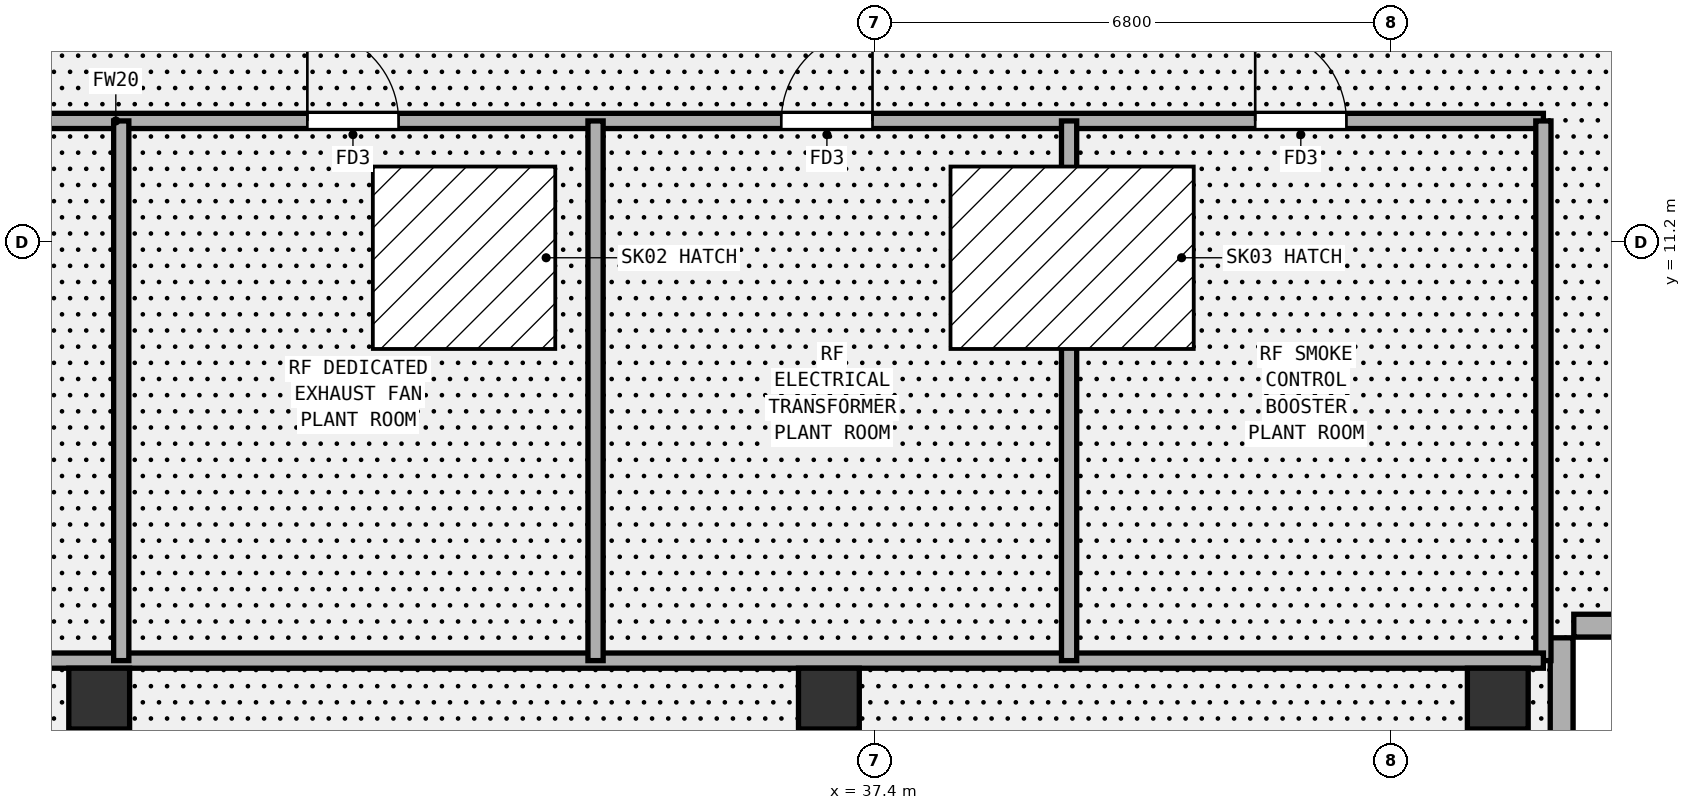
"""IFC4 building model, lengths in metres.
Left out: names, types, materials, properties, quantities, classifications, styles, units other than length and angle.
Written with IfcOpenShell. Run it as: python <this file> out.ifc"""

import sys

from ifc_helpers import new_model, si_unit, direction, frame, frame_2d, origin, origin_2d, place, context, subcontext, project, spatial, rectangle, extrude, element, fill, save


model = new_model("IFC4")
c1 = context("Model", 3, precision=1e-05, world=origin(), true_north=direction((0.0, 1.0)))
c2 = subcontext(c1, "Body", "Model", "MODEL_VIEW")
j1 = project(units=[si_unit("LENGTHUNIT", "METRE"), si_unit("PLANEANGLEUNIT", "RADIAN")], contexts=[c1])
p1 = place(None, origin())
s1 = spatial("IfcSite", under=j1, at=p1, CompositionType="ELEMENT")
p2 = place(p1, origin())
s2 = spatial("IfcBuilding", under=s1, at=p2, CompositionType="ELEMENT")
p3 = place(p2, frame((0.0, 0.0, 360.4)))
s3 = spatial("IfcBuildingStorey", under=s2, at=p3, CompositionType="ELEMENT", Elevation=360.4)
p4 = place(p3, frame((27.2, 5.2, 0.0), z_axis=(0.0, 0.0, 1.0), x_axis=(1.0, 0.0, 0.0)))
e1 = element("IfcColumn", 1, at=p4, inside=s3, PredefinedType="COLUMN", context=c2, shape_type="SweptSolid", body=[
    extrude(rectangle(XDim=0.8, YDim=0.8, at=origin_2d()), origin(), (0.0, 0.0, 1.0), 4.91),
])
p5 = place(p3, frame((36.8, 5.2, 0.0), z_axis=(0.0, 0.0, 1.0), x_axis=(1.0, 0.0, 0.0)))
e2 = element("IfcColumn", 2, at=p5, inside=s3, PredefinedType="COLUMN", context=c2, shape_type="SweptSolid", body=[
    extrude(rectangle(XDim=0.8, YDim=0.8, at=origin_2d()), origin(), (0.0, 0.0, 1.0), 5.094),
])
p6 = place(p3, frame((45.6, 5.2, 0.0), z_axis=(0.0, 0.0, 1.0), x_axis=(1.0, 0.0, 0.0)))
e3 = element("IfcColumn", 3, at=p6, inside=s3, PredefinedType="COLUMN", context=c2, shape_type="SweptSolid", body=[
    extrude(rectangle(XDim=0.8, YDim=0.8, at=origin_2d()), origin(), (0.0, 0.0, 1.0), 5.263),
])
for number, where, z_axis, x_axis in (
    (4, (46.44, 4.0, 0.0), (0.0, 0.0, 1.0), (0.0, 1.0, 0.0)),
    (5, (46.6, 6.16, 0.0), (0.0, 0.0, 1.0), (1.0, 0.0, 0.0)),
):
    element("IfcWall", number, at=place(p3, frame(where, z_axis=z_axis, x_axis=x_axis)), inside=s3, PredefinedType="PARAPET", context=c2, shape_type="SweptSolid", body=[
        extrude(rectangle(XDim=2.0, YDim=0.3, at=frame_2d((1.0, 0.0))), origin(), (0.0, 0.0, 1.0), 5.292),
    ])
p7 = place(p3, frame((21.25, 12.8, 0.0), z_axis=(0.0, 0.0, 1.0), x_axis=(1.0, 0.0, 0.0)))
e6 = element("IfcWall", 6, at=p7, inside=s3, PredefinedType="PARTITIONING", context=c2, shape_type="SweptSolid", body=[
    extrude(rectangle(XDim=24.95, YDim=0.2, at=frame_2d((12.475, 0.0))), origin(), (0.0, 0.0, 1.0), 4.48),
])
p8 = place(p7, frame((2.448, 0.0, 0.0)))
e7 = element("IfcOpeningElement", 7, at=p8, cuts=e6, PredefinedType="OPENING", context=c2, shape_type="SweptSolid", body=[
    extrude(rectangle(XDim=1.2, YDim=2.25, at=frame_2d((0.6, 1.125))), frame((0.0, 0.11, 0.0), z_axis=(0.0, -1.0, 0.0), x_axis=(1.0, 0.0, 0.0)), (0.0, 0.0, 1.0), 0.22),
])
p9 = place(p7, frame((8.689, 0.0, 0.0)))
e8 = element("IfcOpeningElement", 8, at=p9, cuts=e6, PredefinedType="OPENING", context=c2, shape_type="SweptSolid", body=[
    extrude(rectangle(XDim=1.2, YDim=2.25, at=frame_2d((0.6, 1.125))), frame((0.0, 0.11, 0.0), z_axis=(0.0, -1.0, 0.0), x_axis=(1.0, 0.0, 0.0)), (0.0, 0.0, 1.0), 0.22),
])
p10 = place(p7, frame((14.924, 0.0, 0.0)))
e9 = element("IfcOpeningElement", 9, at=p10, cuts=e6, PredefinedType="OPENING", context=c2, shape_type="SweptSolid", body=[
    extrude(rectangle(XDim=1.2, YDim=2.25, at=frame_2d((0.6, 1.125))), frame((0.0, 0.11, 0.0), z_axis=(0.0, -1.0, 0.0), x_axis=(1.0, 0.0, 0.0)), (0.0, 0.0, 1.0), 0.22),
])
p11 = place(p7, frame((21.159, 0.0, 0.0)))
e10 = element("IfcOpeningElement", 10, at=p11, cuts=e6, PredefinedType="OPENING", context=c2, shape_type="SweptSolid", body=[
    extrude(rectangle(XDim=1.2, YDim=2.25, at=frame_2d((0.6, 1.125))), frame((0.0, 0.11, 0.0), z_axis=(0.0, -1.0, 0.0), x_axis=(1.0, 0.0, 0.0)), (0.0, 0.0, 1.0), 0.22),
])
p12 = place(p3, frame((46.2, 5.7, 0.0), z_axis=(0.0, 0.0, 1.0), x_axis=(0.0, 1.0, 0.0)))
e11 = element("IfcWall", 11, at=p12, inside=s3, PredefinedType="PARTITIONING", context=c2, shape_type="SweptSolid", body=[
    extrude(rectangle(XDim=7.1, YDim=0.2, at=frame_2d((3.55, 0.0))), origin(), (0.0, 0.0, 1.0), 4.48),
])
p13 = place(p3, frame((21.25, 5.7, 0.0), z_axis=(0.0, 0.0, 1.0), x_axis=(1.0, 0.0, 0.0)))
e12 = element("IfcWall", 12, at=p13, inside=s3, PredefinedType="PARTITIONING", context=c2, shape_type="SweptSolid", body=[
    extrude(rectangle(XDim=24.95, YDim=0.2, at=frame_2d((12.475, 0.0))), origin(), (0.0, 0.0, 1.0), 4.48),
])
p14 = place(p3, frame((27.49, 5.7, 0.0), z_axis=(0.0, 0.0, 1.0), x_axis=(0.0, 1.0, 0.0)))
e13 = element("IfcWall", 13, at=p14, inside=s3, PredefinedType="PARTITIONING", context=c2, shape_type="SweptSolid", body=[
    extrude(rectangle(XDim=7.1, YDim=0.2, at=frame_2d((3.55, 0.0))), origin(), (0.0, 0.0, 1.0), 4.41),
])
for number, where, z_axis, x_axis in (
    (14, (33.73, 5.7, 0.0), (0.0, 0.0, 1.0), (0.0, 1.0, 0.0)),
    (15, (39.96, 5.7, 0.0), (0.0, 0.0, 1.0), (0.0, 1.0, 0.0)),
):
    element("IfcWall", number, at=place(p3, frame(where, z_axis=z_axis, x_axis=x_axis)), inside=s3, PredefinedType="PARTITIONING", context=c2, shape_type="SweptSolid", body=[
        extrude(rectangle(XDim=7.1, YDim=0.2, at=frame_2d((3.55, 0.0))), origin(), (0.0, 0.0, 1.0), 4.48),
    ])
p15 = place(p3, frame((6.8, 4.0, 4.799), z_axis=(-0.019179722964, -9.68549e-07, 0.999816052195), x_axis=(0.999816052195, -8e-12, 0.019179722964)))
p16 = place(p15, frame((25.205, 7.0, 0.0)))
p17 = place(p16, frame((0.0, 0.0, -0.05)))
e16 = element("IfcWindow", 16, at=p17, inside=s3, PartitioningType="SINGLE_PANEL", PredefinedType="SKYLIGHT", context=c2, shape_type="SweptSolid", body=[
    extrude(rectangle(XDim=2.4, YDim=2.4, at=origin_2d()), origin(), (0.0, 0.0, 1.0), 0.05),
])
p18 = place(p15, frame((33.206, 7.0, 0.0)))
p19 = place(p18, frame((0.0, 0.0, -0.05)))
e17 = element("IfcWindow", 17, at=p19, inside=s3, PartitioningType="SINGLE_PANEL", PredefinedType="SKYLIGHT", context=c2, shape_type="SweptSolid", body=[
    extrude(rectangle(XDim=3.2, YDim=2.4, at=origin_2d()), origin(), (0.0, 0.0, 1.0), 0.05),
])
p20 = place(p9, origin())
e18 = element("IfcDoor", 18, at=p20, inside=s3, OperationType="SINGLE_SWING_LEFT", PredefinedType="DOOR", context=c2, shape_type="SweptSolid", body=[
    extrude(rectangle(XDim=1.2, YDim=2.25, at=frame_2d((0.6, 1.125))), frame((0.0, 0.025, 0.0), z_axis=(0.0, -1.0, 0.0), x_axis=(1.0, 0.0, 0.0)), (0.0, 0.0, 1.0), 0.05),
])
fill(e8, e18)
p21 = place(p10, origin())
e19 = element("IfcDoor", 19, at=p21, inside=s3, OperationType="SINGLE_SWING_RIGHT", PredefinedType="DOOR", context=c2, shape_type="SweptSolid", body=[
    extrude(rectangle(XDim=1.2, YDim=2.25, at=frame_2d((0.6, 1.125))), frame((0.0, 0.025, 0.0), z_axis=(0.0, -1.0, 0.0), x_axis=(1.0, 0.0, 0.0)), (0.0, 0.0, 1.0), 0.05),
])
fill(e9, e19)
p22 = place(p11, origin())
e20 = element("IfcDoor", 20, at=p22, inside=s3, OperationType="SINGLE_SWING_LEFT", PredefinedType="DOOR", context=c2, shape_type="SweptSolid", body=[
    extrude(rectangle(XDim=1.2, YDim=2.25, at=frame_2d((0.6, 1.125))), frame((0.0, 0.025, 0.0), z_axis=(0.0, -1.0, 0.0), x_axis=(1.0, 0.0, 0.0)), (0.0, 0.0, 1.0), 0.05),
])
fill(e10, e20)
save(model, sys.argv[1])
